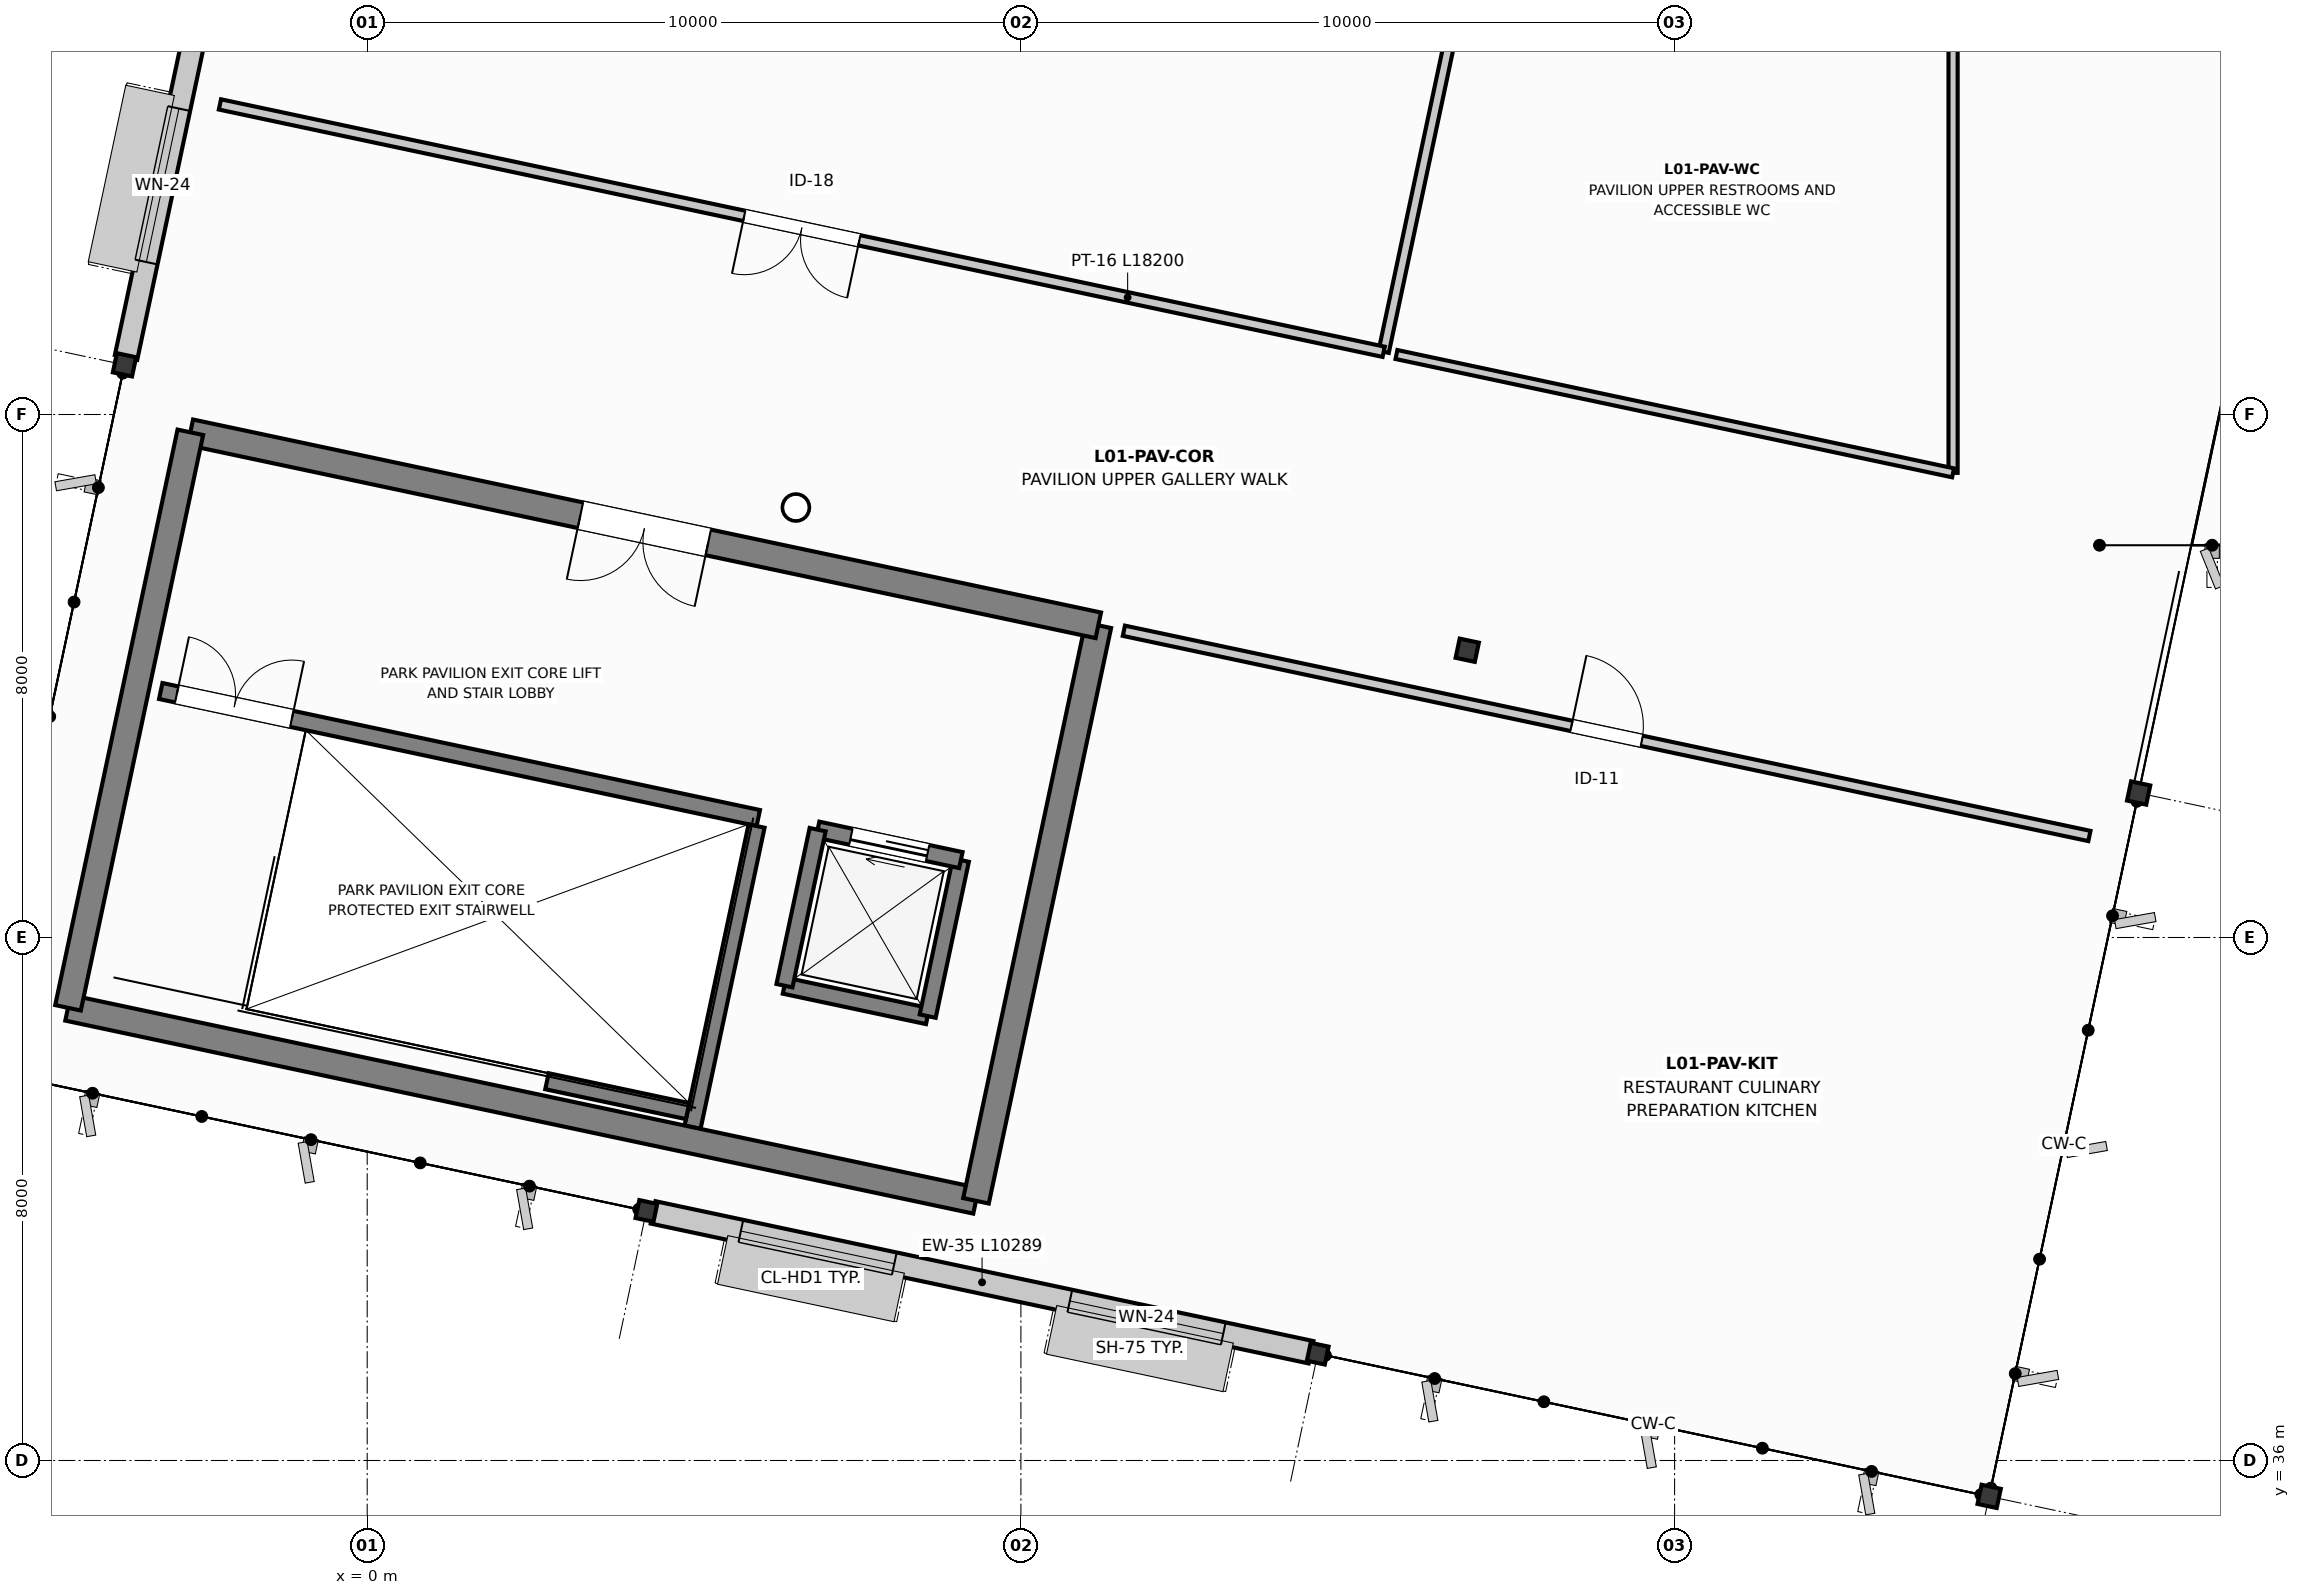
"""IFC4 building model, lengths in metres.
Left out: names, types, materials, properties, quantities, classifications, styles, units other than length and angle.
Written with IfcOpenShell. Run it as: python <this file> out.ifc"""

import sys

from ifc_helpers import new_model, si_unit, direction, frame, frame_2d, origin, origin_2d, place, context, subcontext, project, spatial, rectangle, hollow_rectangle, hollow_circle, i_section, extrude, element, fill, save


model = new_model("IFC4")
c1 = context("Model", 3, precision=1e-05, world=origin(), true_north=direction((0.0, 1.0)))
c2 = subcontext(c1, "Body", "Model", "MODEL_VIEW")
j1 = project(units=[si_unit("LENGTHUNIT", "METRE"), si_unit("PLANEANGLEUNIT", "RADIAN")], contexts=[c1])
p1 = place(None, origin())
s1 = spatial("IfcSite", under=j1, at=p1, CompositionType="ELEMENT")
p2 = place(p1, origin())
s2 = spatial("IfcBuilding", under=s1, at=p2, CompositionType="ELEMENT")
p3 = place(p2, frame((0.0, 0.0, 6.0)))
s3 = spatial("IfcBuildingStorey", under=s2, at=p3, CompositionType="ELEMENT", Elevation=6.0)
p4 = place(p3, frame((-3.713, 52.76, 0.0), z_axis=(0.0, 0.0, 1.0), x_axis=(0.978147600734, -0.207911690818, 0.0)))
e1 = element("IfcColumn", 1, at=p4, inside=s3, PredefinedType="COLUMN", context=c2, shape_type="SweptSolid", body=[
    extrude(i_section(OverallWidth=0.3, OverallDepth=0.3, WebThickness=0.011, FlangeThickness=0.019, FilletRadius=0.027, at=origin_2d()), origin(), (0.0, 0.0, 1.0), 5.4),
])
p5 = place(p3, frame((4.271, 39.817, 0.0), z_axis=(0.0, 0.0, 1.0), x_axis=(0.978147600734, -0.207911690818, 0.0)))
e2 = element("IfcColumn", 2, at=p5, inside=s3, PredefinedType="COLUMN", context=c2, shape_type="SweptSolid", body=[
    extrude(i_section(OverallWidth=0.28, OverallDepth=0.28, WebThickness=0.011, FlangeThickness=0.018, FilletRadius=0.024, at=origin_2d()), origin(), (0.0, 0.0, 1.0), 5.4),
])
p6 = place(p3, frame((6.558, 50.577, 0.0), z_axis=(0.0, 0.0, 1.0), x_axis=(0.978147600734, -0.207911690818, 0.0)))
e3 = element("IfcColumn", 3, at=p6, inside=s3, PredefinedType="COLUMN", context=c2, shape_type="SweptSolid", body=[
    extrude(hollow_circle(Radius=0.203, WallThickness=0.016, at=origin_2d()), origin(), (0.0, 0.0, 1.0), 5.4),
])
p7 = place(p3, frame((14.541, 37.634, 0.0), z_axis=(0.0, 0.0, 1.0), x_axis=(0.978147600734, -0.207911690818, 0.0)))
e4 = element("IfcColumn", 4, at=p7, inside=s3, PredefinedType="COLUMN", context=c2, shape_type="SweptSolid", body=[
    extrude(i_section(OverallWidth=0.28, OverallDepth=0.28, WebThickness=0.011, FlangeThickness=0.018, FilletRadius=0.024, at=origin_2d()), origin(), (0.0, 0.0, 1.0), 5.4),
])
p8 = place(p3, frame((16.828, 48.394, 0.0), z_axis=(0.0, 0.0, 1.0), x_axis=(0.978147600734, -0.207911690818, 0.0)))
e5 = element("IfcColumn", 5, at=p8, inside=s3, PredefinedType="COLUMN", context=c2, shape_type="SweptSolid", body=[
    extrude(hollow_rectangle(XDim=0.3, YDim=0.3, WallThickness=0.016, InnerFilletRadius=0.016, OuterFilletRadius=0.032, at=origin_2d()), origin(), (0.0, 0.0, 1.0), 5.4),
])
for number, where, z_axis, x_axis in (
    (6, (24.812, 35.451, 0.0), (0.0, 0.0, 1.0), (0.978, -0.208, 0.0)),
    (7, (27.099, 46.21, 0.0), (0.0, 0.0, 1.0), (0.978, -0.208, 0.0)),
):
    element("IfcColumn", number, at=place(p3, frame(where, z_axis=z_axis, x_axis=x_axis)), inside=s3, PredefinedType="COLUMN", context=c2, shape_type="SweptSolid", body=[
        extrude(i_section(OverallWidth=0.3, OverallDepth=0.3, WebThickness=0.011, FlangeThickness=0.019, FilletRadius=0.027, at=origin_2d()), origin(), (0.0, 0.0, 1.0), 5.4),
    ])
p9 = place(p3, frame((4.374, 39.795, 0.0), z_axis=(0.0, 0.0, 1.0), x_axis=(0.978149513342, -0.207902692501, 0.0)))
e8 = element("IfcWall", 8, at=p9, inside=s3, PredefinedType="STANDARD", context=c2, shape_type="SweptSolid", body=[
    extrude(rectangle(XDim=10.289, YDim=0.35, at=frame_2d((5.145, 0.0))), origin(), (0.0, 0.0, 1.0), 4.93),
])
p10 = place(p9, frame((1.372, 0.0, 0.85)))
e9 = element("IfcOpeningElement", 9, at=p10, cuts=e8, PredefinedType="OPENING", context=c2, shape_type="SweptSolid", body=[
    extrude(rectangle(XDim=2.4, YDim=1.8, at=frame_2d((1.2, 0.9))), frame((0.0, 0.185, 0.0), z_axis=(0.0, -1.0, 0.0), x_axis=(1.0, 0.0, 0.0)), (0.0, 0.0, 1.0), 0.37),
])
p11 = place(p9, frame((6.517, 0.0, 0.85)))
e10 = element("IfcOpeningElement", 10, at=p11, cuts=e8, PredefinedType="OPENING", context=c2, shape_type="SweptSolid", body=[
    extrude(rectangle(XDim=2.4, YDim=1.8, at=frame_2d((1.2, 0.9))), frame((0.0, 0.185, 0.0), z_axis=(0.0, -1.0, 0.0), x_axis=(1.0, 0.0, 0.0)), (0.0, 0.0, 1.0), 0.37),
])
p12 = place(p3, frame((-1.45, 63.407, 0.0), z_axis=(0.0, 0.0, 1.0), x_axis=(-0.207914283178, -0.978147049707, 0.0)))
e11 = element("IfcWall", 11, at=p12, inside=s3, PredefinedType="STANDARD", context=c2, shape_type="SweptSolid", body=[
    extrude(rectangle(XDim=10.769, YDim=0.35, at=frame_2d((5.385, 0.0))), origin(), (0.0, 0.0, 1.0), 4.93),
])
p13 = place(p12, frame((1.492, 0.0, 0.85)))
e12 = element("IfcOpeningElement", 12, at=p13, cuts=e11, PredefinedType="OPENING", context=c2, shape_type="SweptSolid", body=[
    extrude(rectangle(XDim=2.4, YDim=1.8, at=frame_2d((1.2, 0.9))), frame((0.0, 0.185, 0.0), z_axis=(0.0, -1.0, 0.0), x_axis=(1.0, 0.0, 0.0)), (0.0, 0.0, 1.0), 0.37),
])
p14 = place(p12, frame((6.877, 0.0, 0.85)))
e13 = element("IfcOpeningElement", 13, at=p14, cuts=e11, PredefinedType="OPENING", context=c2, shape_type="SweptSolid", body=[
    extrude(rectangle(XDim=2.4, YDim=1.8, at=frame_2d((1.2, 0.9))), frame((0.0, 0.185, 0.0), z_axis=(0.0, -1.0, 0.0), x_axis=(1.0, 0.0, 0.0)), (0.0, 0.0, 1.0), 0.37),
])
p15 = place(p3, frame((6.383, 43.263, 0.0), z_axis=(0.0, 0.0, 1.0), x_axis=(0.978150567781, -0.207897731466, 0.0)))
e14 = element("IfcWall", 14, at=p15, inside=s3, PredefinedType="SOLIDWALL", context=c2, shape_type="SweptSolid", body=[
    extrude(rectangle(XDim=2.24, YDim=0.25, at=frame_2d((1.12, 0.0))), origin(), (0.0, 0.0, 1.0), 5.05),
])
p16 = place(p3, frame((8.574, 42.797, 0.0), z_axis=(0.0, 0.0, 1.0), x_axis=(0.207908261464, 0.978148329659, 0.0)))
e15 = element("IfcWall", 15, at=p16, inside=s3, PredefinedType="SOLIDWALL", context=c2, shape_type="SweptSolid", body=[
    extrude(rectangle(XDim=2.44, YDim=0.25, at=frame_2d((1.22, 0.0))), origin(), (0.0, 0.0, 1.0), 5.05),
])
p17 = place(p3, frame((9.082, 45.184, 0.0), z_axis=(0.0, 0.0, 1.0), x_axis=(-0.978150567781, 0.207897731466, 0.0)))
e16 = element("IfcWall", 16, at=p17, inside=s3, PredefinedType="SOLIDWALL", context=c2, shape_type="SweptSolid", body=[
    extrude(rectangle(XDim=2.24, YDim=0.25, at=frame_2d((1.12, 0.0))), origin(), (0.0, 0.0, 1.0), 5.05),
])
p18 = place(p17, frame((0.52, 0.0, 0.0)))
e17 = element("IfcOpeningElement", 17, at=p18, cuts=e16, PredefinedType="OPENING", context=c2, shape_type="SweptSolid", body=[
    extrude(rectangle(XDim=1.2, YDim=2.2, at=frame_2d((0.6, 1.1))), frame((0.0, 0.135, 0.0), z_axis=(0.0, -1.0, 0.0), x_axis=(1.0, 0.0, 0.0)), (0.0, 0.0, 1.0), 0.27),
])
p19 = place(p3, frame((6.891, 45.65, 0.0), z_axis=(0.0, 0.0, 1.0), x_axis=(-0.207908261464, -0.978148329659, 0.0)))
e18 = element("IfcWall", 18, at=p19, inside=s3, PredefinedType="SOLIDWALL", context=c2, shape_type="SweptSolid", body=[
    extrude(rectangle(XDim=2.44, YDim=0.25, at=frame_2d((1.22, 0.0))), origin(), (0.0, 0.0, 1.0), 5.05),
])
p20 = place(p3, frame((-3.158, 47.77, 0.0), z_axis=(0.0, 0.0, 1.0), x_axis=(0.978146230105, -0.207918139013, 0.0)))
e19 = element("IfcWall", 19, at=p20, inside=s3, PredefinedType="SOLIDWALL", context=c2, shape_type="SweptSolid", body=[
    extrude(rectangle(XDim=9.345, YDim=0.25, at=frame_2d((4.673, 0.0))), origin(), (0.0, 0.0, 1.0), 4.93),
])
p21 = place(p20, frame((0.25, 0.0, 0.0)))
e20 = element("IfcOpeningElement", 20, at=p21, cuts=e19, PredefinedType="OPENING", context=c2, shape_type="SweptSolid", body=[
    extrude(rectangle(XDim=1.8, YDim=2.25, at=frame_2d((0.9, 1.125))), frame((0.0, 0.135, 0.0), z_axis=(0.0, -1.0, 0.0), x_axis=(1.0, 0.0, 0.0)), (0.0, 0.0, 1.0), 0.27),
])
p22 = place(p3, frame((4.977, 41.098, 0.0), z_axis=(0.0, 0.0, 1.0), x_axis=(0.207897606308, 0.978150594383, 0.0)))
e21 = element("IfcWall", 21, at=p22, inside=s3, PredefinedType="SOLIDWALL", context=c2, shape_type="SweptSolid", body=[
    extrude(rectangle(XDim=4.71, YDim=0.25, at=frame_2d((2.355, 0.0))), origin(), (0.0, 0.0, 1.0), 5.05),
])
p23 = place(p3, frame((2.75, 41.801, 0.0), z_axis=(0.0, 0.0, 1.0), x_axis=(0.978147643724, -0.207911488563, 0.0)))
e22 = element("IfcWall", 22, at=p23, inside=s3, PredefinedType="SOLIDWALL", context=c2, shape_type="SweptSolid", body=[
    extrude(rectangle(XDim=2.2, YDim=0.25, at=frame_2d((1.1, 0.0))), origin(), (0.0, 0.0, 1.0), 4.93),
])
p24 = place(p3, frame((-4.577, 42.924, 0.0), z_axis=(0.0, 0.0, 1.0), x_axis=(0.978148272054, -0.20790853248, 0.0)))
e23 = element("IfcWall", 23, at=p24, inside=s3, PredefinedType="SHEAR", context=c2, shape_type="SweptSolid", body=[
    extrude(rectangle(XDim=14.2, YDim=0.4, at=frame_2d((7.1, 0.0))), origin(), (0.0, 0.0, 1.0), 5.05),
])
p25 = place(p3, frame((9.313, 39.972, 0.0), z_axis=(0.0, 0.0, 1.0), x_axis=(0.20791177806, 0.97814758219, 0.0)))
e24 = element("IfcWall", 24, at=p25, inside=s3, PredefinedType="SHEAR", context=c2, shape_type="SweptSolid", body=[
    extrude(rectangle(XDim=9.0, YDim=0.4, at=frame_2d((4.5, 0.0))), origin(), (0.0, 0.0, 1.0), 5.05),
])
p26 = place(p3, frame((11.184, 48.775, 0.0), z_axis=(0.0, 0.0, 1.0), x_axis=(-0.978148272054, 0.20790853248, 0.0)))
e25 = element("IfcWall", 25, at=p26, inside=s3, PredefinedType="SHEAR", context=c2, shape_type="SweptSolid", body=[
    extrude(rectangle(XDim=14.2, YDim=0.4, at=frame_2d((7.1, 0.0))), origin(), (0.0, 0.0, 1.0), 5.05),
])
p27 = place(p26, frame((6.1, 0.0, 0.0)))
e26 = element("IfcOpeningElement", 26, at=p27, cuts=e25, PredefinedType="OPENING", context=c2, shape_type="SweptSolid", body=[
    extrude(rectangle(XDim=2.0, YDim=2.3, at=frame_2d((1.0, 1.15))), frame((0.0, 0.21, 0.0), z_axis=(0.0, -1.0, 0.0), x_axis=(1.0, 0.0, 0.0)), (0.0, 0.0, 1.0), 0.42),
])
p28 = place(p3, frame((-2.705, 51.728, 0.0), z_axis=(0.0, 0.0, 1.0), x_axis=(-0.20791177806, -0.97814758219, 0.0)))
e27 = element("IfcWall", 27, at=p28, inside=s3, PredefinedType="SHEAR", context=c2, shape_type="SweptSolid", body=[
    extrude(rectangle(XDim=9.0, YDim=0.4, at=frame_2d((4.5, 0.0))), origin(), (0.0, 0.0, 1.0), 5.05),
])
p29 = place(p3, frame((19.167, 69.979, 0.0), z_axis=(0.0, 0.0, 1.0), x_axis=(-0.207913331167, -0.978147252065, 0.0)))
e28 = element("IfcWall", 28, at=p29, inside=s3, PredefinedType="PARTITIONING", context=c2, shape_type="SweptSolid", body=[
    extrude(rectangle(XDim=17.4, YDim=0.16, at=frame_2d((8.7, 0.0))), origin(), (0.0, 0.0, 1.0), 4.93),
])
p30 = place(p3, frame((15.549, 52.959, 0.0), z_axis=(0.0, 0.0, 1.0), x_axis=(-0.978147552437, 0.207911918034, 0.0)))
e29 = element("IfcWall", 29, at=p30, inside=s3, PredefinedType="PARTITIONING", context=c2, shape_type="SweptSolid", body=[
    extrude(rectangle(XDim=18.2, YDim=0.16, at=frame_2d((9.1, 0.0))), origin(), (0.0, 0.0, 1.0), 4.93),
])
p31 = place(p30, frame((8.2, 0.0, 0.0)))
e30 = element("IfcOpeningElement", 30, at=p31, cuts=e29, PredefinedType="OPENING", context=c2, shape_type="SweptSolid", body=[
    extrude(rectangle(XDim=1.8, YDim=2.25, at=frame_2d((0.9, 1.125))), frame((0.0, 0.09, 0.0), z_axis=(0.0, -1.0, 0.0), x_axis=(1.0, 0.0, 0.0)), (0.0, 0.0, 1.0), 0.18),
])
p32 = place(p3, frame((11.575, 48.692, 0.0), z_axis=(0.0, 0.0, 1.0), x_axis=(0.978147353885, -0.207912852149, 0.0)))
e31 = element("IfcWall", 31, at=p32, inside=s3, PredefinedType="PARTITIONING", context=c2, shape_type="SweptSolid", body=[
    extrude(rectangle(XDim=15.1, YDim=0.16, at=frame_2d((7.55, 0.0))), origin(), (0.0, 0.0, 1.0), 4.93),
])
p33 = place(p32, frame((7.0, 0.0, 0.0)))
e32 = element("IfcOpeningElement", 32, at=p33, cuts=e31, PredefinedType="OPENING", context=c2, shape_type="SweptSolid", body=[
    extrude(rectangle(XDim=1.1, YDim=2.2, at=frame_2d((0.55, 1.1))), frame((0.0, 0.09, 0.0), z_axis=(0.0, -1.0, 0.0), x_axis=(1.0, 0.0, 0.0)), (0.0, 0.0, 1.0), 0.18),
])
p34 = place(p3, frame((24.26, 65.74, 0.0), z_axis=(0.0, 0.0, 1.0), x_axis=(0.0, -1.0, 0.0)))
e33 = element("IfcWall", 33, at=p34, inside=s3, PredefinedType="PARTITIONING", context=c2, shape_type="SweptSolid", body=[
    extrude(rectangle(XDim=14.632, YDim=0.14, at=frame_2d((7.316, 0.0))), origin(), (0.0, 0.0, 1.0), 4.93),
])
p35 = place(p34, frame((6.816, 0.0, 0.0)))
e34 = element("IfcOpeningElement", 34, at=p35, cuts=e33, PredefinedType="OPENING", context=c2, shape_type="SweptSolid", body=[
    extrude(rectangle(XDim=1.0, YDim=2.15, at=frame_2d((0.5, 1.075))), frame((0.0, 0.08, 0.0), z_axis=(0.0, -1.0, 0.0), x_axis=(1.0, 0.0, 0.0)), (0.0, 0.0, 1.0), 0.16),
])
p36 = place(p3, frame((24.26, 51.108, 0.0), z_axis=(0.0, 0.0, 1.0), x_axis=(-0.978147550902, 0.207911925258, 0.0)))
e35 = element("IfcWall", 35, at=p36, inside=s3, PredefinedType="PARTITIONING", context=c2, shape_type="SweptSolid", body=[
    extrude(rectangle(XDim=8.705, YDim=0.14, at=frame_2d((4.353, 0.0))), origin(), (0.0, 0.0, 1.0), 4.93),
])
p37 = place(p10, origin())
e36 = element("IfcWindow", 36, at=p37, inside=s3, PartitioningType="SINGLE_PANEL", PredefinedType="WINDOW", context=c2, shape_type="SweptSolid", body=[
    extrude(rectangle(XDim=2.4, YDim=1.8, at=frame_2d((1.2, 0.9))), frame((0.0, 0.03, 0.0), z_axis=(0.0, -1.0, 0.0), x_axis=(1.0, 0.0, 0.0)), (0.0, 0.0, 1.0), 0.06),
])
fill(e9, e36)
p38 = place(p11, origin())
e37 = element("IfcWindow", 37, at=p38, inside=s3, PartitioningType="SINGLE_PANEL", PredefinedType="WINDOW", context=c2, shape_type="SweptSolid", body=[
    extrude(rectangle(XDim=2.4, YDim=1.8, at=frame_2d((1.2, 0.9))), frame((0.0, 0.03, 0.0), z_axis=(0.0, -1.0, 0.0), x_axis=(1.0, 0.0, 0.0)), (0.0, 0.0, 1.0), 0.06),
])
fill(e10, e37)
p39 = place(p14, origin())
e38 = element("IfcWindow", 38, at=p39, inside=s3, PartitioningType="SINGLE_PANEL", PredefinedType="WINDOW", context=c2, shape_type="SweptSolid", body=[
    extrude(rectangle(XDim=2.4, YDim=1.8, at=frame_2d((1.2, 0.9))), frame((0.0, 0.03, 0.0), z_axis=(0.0, -1.0, 0.0), x_axis=(1.0, 0.0, 0.0)), (0.0, 0.0, 1.0), 0.06),
])
fill(e13, e38)
p40 = place(p18, origin())
e39 = element("IfcDoor", 39, at=p40, inside=s3, OperationType="SLIDING_TO_RIGHT", PredefinedType="DOOR", context=c2, shape_type="SweptSolid", body=[
    extrude(rectangle(XDim=1.2, YDim=2.2, at=frame_2d((0.6, 1.1))), frame((0.0, 0.025, 0.0), z_axis=(0.0, -1.0, 0.0), x_axis=(1.0, 0.0, 0.0)), (0.0, 0.0, 1.0), 0.05),
])
fill(e17, e39)
p41 = place(p21, origin())
e40 = element("IfcDoor", 40, at=p41, inside=s3, OperationType="DOUBLE_DOOR_SINGLE_SWING", PredefinedType="DOOR", context=c2, shape_type="SweptSolid", body=[
    extrude(rectangle(XDim=1.8, YDim=2.25, at=frame_2d((0.9, 1.125))), frame((0.0, 0.025, 0.0), z_axis=(0.0, -1.0, 0.0), x_axis=(1.0, 0.0, 0.0)), (0.0, 0.0, 1.0), 0.05),
])
fill(e20, e40)
p42 = place(p27, origin())
e41 = element("IfcDoor", 41, at=p42, inside=s3, OperationType="DOUBLE_DOOR_SINGLE_SWING", PredefinedType="DOOR", context=c2, shape_type="SweptSolid", body=[
    extrude(rectangle(XDim=2.0, YDim=2.3, at=frame_2d((1.0, 1.15))), frame((0.0, 0.025, 0.0), z_axis=(0.0, -1.0, 0.0), x_axis=(1.0, 0.0, 0.0)), (0.0, 0.0, 1.0), 0.05),
])
fill(e26, e41)
p43 = place(p31, origin())
e42 = element("IfcDoor", 42, at=p43, inside=s3, OperationType="DOUBLE_DOOR_SINGLE_SWING", PredefinedType="DOOR", context=c2, shape_type="SweptSolid", body=[
    extrude(rectangle(XDim=1.8, YDim=2.25, at=frame_2d((0.9, 1.125))), frame((0.0, 0.025, 0.0), z_axis=(0.0, -1.0, 0.0), x_axis=(1.0, 0.0, 0.0)), (0.0, 0.0, 1.0), 0.05),
])
fill(e30, e42)
p44 = place(p33, origin())
e43 = element("IfcDoor", 43, at=p44, inside=s3, OperationType="SINGLE_SWING_LEFT", PredefinedType="DOOR", context=c2, shape_type="SweptSolid", body=[
    extrude(rectangle(XDim=1.1, YDim=2.2, at=frame_2d((0.55, 1.1))), frame((0.0, 0.025, 0.0), z_axis=(0.0, -1.0, 0.0), x_axis=(1.0, 0.0, 0.0)), (0.0, 0.0, 1.0), 0.05),
])
fill(e32, e43)
save(model, sys.argv[1])
